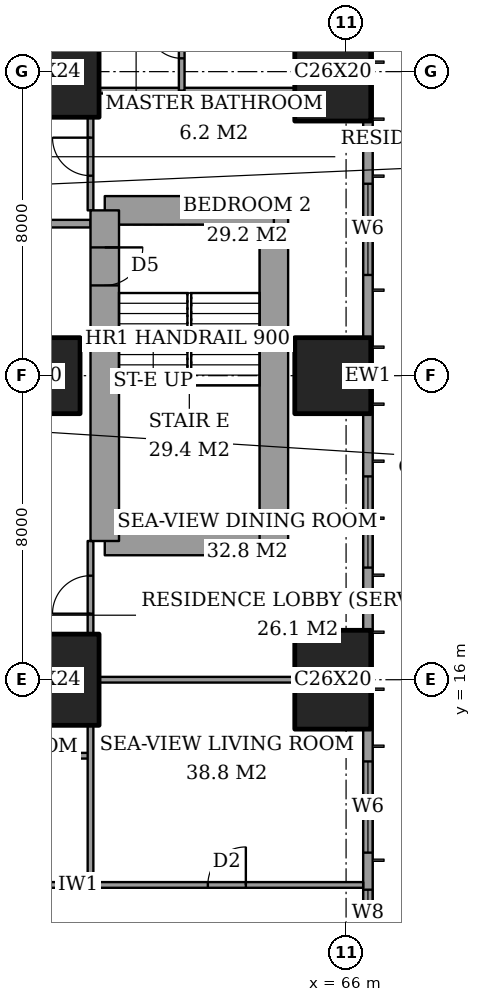
"""IFC4 building model, lengths in metres.
Left out: names, types, materials, properties, quantities, classifications, styles, units other than length and angle.
Written with IfcOpenShell. Run it as: python <this file> out.ifc"""

import sys

from ifc_helpers import new_model, si_unit, direction, frame, frame_2d, origin, origin_2d, place, context, subcontext, project, spatial, rectangle, extrude, element, fill, save


model = new_model("IFC4")
c1 = context("Model", 3, precision=1e-05, world=origin(), true_north=direction((0.0, 1.0)))
c2 = subcontext(c1, "Body", "Model", "MODEL_VIEW")
j1 = project(units=[si_unit("LENGTHUNIT", "METRE"), si_unit("PLANEANGLEUNIT", "RADIAN")], contexts=[c1])
p1 = place(None, origin())
s1 = spatial("IfcSite", under=j1, at=p1, CompositionType="ELEMENT")
p2 = place(p1, origin())
s2 = spatial("IfcBuilding", under=s1, at=p2, CompositionType="ELEMENT")
p3 = place(p2, frame((0.0, 0.0, 72.8)))
s3 = spatial("IfcBuildingStorey", under=s2, at=p3, CompositionType="ELEMENT", Elevation=72.8)
p4 = place(p3, frame((58.0, 16.0, 0.0), z_axis=(0.0, 0.0, 1.0), x_axis=(1.0, 0.0, 0.0)))
e1 = element("IfcColumn", 1, at=p4, inside=s3, PredefinedType="COLUMN", context=c2, shape_type="SweptSolid", body=[
    extrude(rectangle(XDim=3.0, YDim=2.4, at=origin_2d()), origin(), (0.0, 0.0, 1.0), 3.6),
])
p5 = place(p3, frame((58.0, 24.0, 0.0), z_axis=(0.0, 0.0, 1.0), x_axis=(1.0, 0.0, 0.0)))
e2 = element("IfcColumn", 2, at=p5, inside=s3, PredefinedType="COLUMN", context=c2, shape_type="SweptSolid", body=[
    extrude(rectangle(XDim=2.0, YDim=2.0, at=origin_2d()), origin(), (0.0, 0.0, 1.0), 3.6),
])
p6 = place(p3, frame((58.0, 32.0, 0.0), z_axis=(0.0, 0.0, 1.0), x_axis=(1.0, 0.0, 0.0)))
e3 = element("IfcColumn", 3, at=p6, inside=s3, PredefinedType="COLUMN", context=c2, shape_type="SweptSolid", body=[
    extrude(rectangle(XDim=3.0, YDim=2.4, at=origin_2d()), origin(), (0.0, 0.0, 1.0), 3.6),
])
p7 = place(p3, frame((65.65, 16.0, 0.0), z_axis=(0.0, 0.0, 1.0), x_axis=(0.0, 1.0, 0.0)))
e4 = element("IfcColumn", 4, at=p7, inside=s3, PredefinedType="COLUMN", context=c2, shape_type="SweptSolid", body=[
    extrude(rectangle(XDim=2.6, YDim=2.0, at=origin_2d()), origin(), (0.0, 0.0, 1.0), 3.6),
])
p8 = place(p3, frame((65.65, 24.0, 0.0), z_axis=(0.0, 0.0, 1.0), x_axis=(1.0, 0.0, 0.0)))
e5 = element("IfcColumn", 5, at=p8, inside=s3, PredefinedType="COLUMN", context=c2, shape_type="SweptSolid", body=[
    extrude(rectangle(XDim=2.0, YDim=2.0, at=origin_2d()), origin(), (0.0, 0.0, 1.0), 3.6),
])
p9 = place(p3, frame((65.65, 32.0, 0.0), z_axis=(0.0, 0.0, 1.0), x_axis=(0.0, 1.0, 0.0)))
e6 = element("IfcColumn", 6, at=p9, inside=s3, PredefinedType="COLUMN", context=c2, shape_type="SweptSolid", body=[
    extrude(rectangle(XDim=2.6, YDim=2.0, at=origin_2d()), origin(), (0.0, 0.0, 1.0), 3.6),
])
p10 = place(p3, frame((59.65, 19.65, 0.0), z_axis=(0.0, 0.0, 1.0), x_axis=(1.0, 0.0, 0.0)))
e7 = element("IfcWall", 7, at=p10, inside=s3, PredefinedType="SHEAR", context=c2, shape_type="SweptSolid", body=[
    extrude(rectangle(XDim=4.45, YDim=0.75, at=frame_2d((2.225, 0.0))), origin(), (0.0, 0.0, 1.0), 3.6),
])
p11 = place(p3, frame((64.1, 19.65, 0.0), z_axis=(0.0, 0.0, 1.0), x_axis=(0.0, 1.0, 0.0)))
e8 = element("IfcWall", 8, at=p11, inside=s3, PredefinedType="SHEAR", context=c2, shape_type="SweptSolid", body=[
    extrude(rectangle(XDim=8.7, YDim=0.75, at=frame_2d((4.35, 0.0))), origin(), (0.0, 0.0, 1.0), 3.6),
])
p12 = place(p3, frame((64.1, 28.35, 0.0), z_axis=(0.0, 0.0, 1.0), x_axis=(-1.0, 0.0, 0.0)))
e9 = element("IfcWall", 9, at=p12, inside=s3, PredefinedType="SHEAR", context=c2, shape_type="SweptSolid", body=[
    extrude(rectangle(XDim=4.45, YDim=0.75, at=frame_2d((2.225, 0.0))), origin(), (0.0, 0.0, 1.0), 3.6),
])
p13 = place(p3, frame((59.65, 28.35, 0.0), z_axis=(0.0, 0.0, 1.0), x_axis=(0.0, -1.0, 0.0)))
e10 = element("IfcWall", 10, at=p13, inside=s3, PredefinedType="SHEAR", context=c2, shape_type="SweptSolid", body=[
    extrude(rectangle(XDim=8.7, YDim=0.75, at=frame_2d((4.35, 0.0))), origin(), (0.0, 0.0, 1.0), 3.6),
])
p14 = place(p13, frame((0.975, 0.0, 0.0)))
e11 = element("IfcOpeningElement", 11, at=p14, cuts=e10, PredefinedType="OPENING", context=c2, shape_type="SweptSolid", body=[
    extrude(rectangle(XDim=1.0, YDim=2.1, at=frame_2d((0.5, 1.05))), frame((0.0, 0.385, 0.0), z_axis=(0.0, -1.0, 0.0), x_axis=(1.0, 0.0, 0.0)), (0.0, 0.0, 1.0), 0.77),
])
p15 = place(p3, frame((66.575, 3.175, 0.0), z_axis=(0.0, 0.0, 1.0), x_axis=(0.0, 1.0, 0.0)))
e12 = element("IfcWall", 12, at=p15, inside=s3, PredefinedType="SOLIDWALL", context=c2, shape_type="SweptSolid", body=[
    extrude(rectangle(XDim=41.65, YDim=0.25, at=frame_2d((20.825, 0.0))), origin(), (0.0, 0.0, 1.0), 3.6),
])
p16 = place(p15, frame((0.775, 0.0, 0.6)))
e13 = element("IfcOpeningElement", 13, at=p16, cuts=e12, PredefinedType="OPENING", context=c2, shape_type="SweptSolid", body=[
    extrude(rectangle(XDim=2.4, YDim=2.0, at=frame_2d((1.2, 1.0))), frame((0.0, 0.135, 0.0), z_axis=(0.0, -1.0, 0.0), x_axis=(1.0, 0.0, 0.0)), (0.0, 0.0, 1.0), 0.27),
])
p17 = place(p15, frame((6.1, 0.0, 0.6)))
e14 = element("IfcOpeningElement", 14, at=p17, cuts=e12, PredefinedType="OPENING", context=c2, shape_type="SweptSolid", body=[
    extrude(rectangle(XDim=1.2, YDim=2.0, at=frame_2d((0.6, 1.0))), frame((0.0, 0.135, 0.0), z_axis=(0.0, -1.0, 0.0), x_axis=(1.0, 0.0, 0.0)), (0.0, 0.0, 1.0), 0.27),
])
p18 = place(p15, frame((8.275, 0.0, 0.6)))
e15 = element("IfcOpeningElement", 15, at=p18, cuts=e12, PredefinedType="OPENING", context=c2, shape_type="SweptSolid", body=[
    extrude(rectangle(XDim=2.4, YDim=2.0, at=frame_2d((1.2, 1.0))), frame((0.0, 0.135, 0.0), z_axis=(0.0, -1.0, 0.0), x_axis=(1.0, 0.0, 0.0)), (0.0, 0.0, 1.0), 0.27),
])
p19 = place(p15, frame((15.775, 0.0, 0.6)))
e16 = element("IfcOpeningElement", 16, at=p19, cuts=e12, PredefinedType="OPENING", context=c2, shape_type="SweptSolid", body=[
    extrude(rectangle(XDim=2.4, YDim=2.0, at=frame_2d((1.2, 1.0))), frame((0.0, 0.135, 0.0), z_axis=(0.0, -1.0, 0.0), x_axis=(1.0, 0.0, 0.0)), (0.0, 0.0, 1.0), 0.27),
])
p20 = place(p15, frame((23.475, 0.0, 0.6)))
e17 = element("IfcOpeningElement", 17, at=p20, cuts=e12, PredefinedType="OPENING", context=c2, shape_type="SweptSolid", body=[
    extrude(rectangle(XDim=2.4, YDim=2.0, at=frame_2d((1.2, 1.0))), frame((0.0, 0.135, 0.0), z_axis=(0.0, -1.0, 0.0), x_axis=(1.0, 0.0, 0.0)), (0.0, 0.0, 1.0), 0.27),
])
p21 = place(p15, frame((30.975, 0.0, 0.6)))
e18 = element("IfcOpeningElement", 18, at=p21, cuts=e12, PredefinedType="OPENING", context=c2, shape_type="SweptSolid", body=[
    extrude(rectangle(XDim=2.4, YDim=2.0, at=frame_2d((1.2, 1.0))), frame((0.0, 0.135, 0.0), z_axis=(0.0, -1.0, 0.0), x_axis=(1.0, 0.0, 0.0)), (0.0, 0.0, 1.0), 0.27),
])
p22 = place(p15, frame((34.5, 0.0, 0.6)))
e19 = element("IfcOpeningElement", 19, at=p22, cuts=e12, PredefinedType="OPENING", context=c2, shape_type="SweptSolid", body=[
    extrude(rectangle(XDim=1.2, YDim=2.0, at=frame_2d((0.6, 1.0))), frame((0.0, 0.135, 0.0), z_axis=(0.0, -1.0, 0.0), x_axis=(1.0, 0.0, 0.0)), (0.0, 0.0, 1.0), 0.27),
])
p23 = place(p15, frame((38.475, 0.0, 0.6)))
e20 = element("IfcOpeningElement", 20, at=p23, cuts=e12, PredefinedType="OPENING", context=c2, shape_type="SweptSolid", body=[
    extrude(rectangle(XDim=2.4, YDim=2.0, at=frame_2d((1.2, 1.0))), frame((0.0, 0.135, 0.0), z_axis=(0.0, -1.0, 0.0), x_axis=(1.0, 0.0, 0.0)), (0.0, 0.0, 1.0), 0.27),
])
p24 = place(p3, frame((41.439, 10.6, 0.0), z_axis=(0.0, 0.0, 1.0), x_axis=(1.0, 0.0, 0.0)))
e21 = element("IfcWall", 21, at=p24, inside=s3, PredefinedType="PARTITIONING", context=c2, shape_type="SweptSolid", body=[
    extrude(rectangle(XDim=25.011, YDim=0.15, at=frame_2d((12.505, 0.0))), origin(), (0.0, 0.0, 1.0), 3.35),
])
p25 = place(p24, frame((10.761, 0.0, 0.0)))
e22 = element("IfcOpeningElement", 22, at=p25, cuts=e21, PredefinedType="OPENING", context=c2, shape_type="SweptSolid", body=[
    extrude(rectangle(XDim=1.0, YDim=2.1, at=frame_2d((0.5, 1.05))), frame((0.0, 0.085, 0.0), z_axis=(0.0, -1.0, 0.0), x_axis=(1.0, 0.0, 0.0)), (0.0, 0.0, 1.0), 0.17),
])
p26 = place(p24, frame((20.924, 0.0, 0.0)))
e23 = element("IfcOpeningElement", 23, at=p26, cuts=e21, PredefinedType="OPENING", context=c2, shape_type="SweptSolid", body=[
    extrude(rectangle(XDim=1.0, YDim=2.1, at=frame_2d((0.5, 1.05))), frame((0.0, 0.085, 0.0), z_axis=(0.0, -1.0, 0.0), x_axis=(1.0, 0.0, 0.0)), (0.0, 0.0, 1.0), 0.17),
])
p27 = place(p24, frame((15.749, 0.0, 0.0)))
e24 = element("IfcOpeningElement", 24, at=p27, cuts=e21, PredefinedType="OPENING", context=c2, shape_type="SweptSolid", body=[
    extrude(rectangle(XDim=0.9, YDim=2.1, at=frame_2d((0.45, 1.05))), frame((0.0, 0.085, 0.0), z_axis=(0.0, -1.0, 0.0), x_axis=(1.0, 0.0, 0.0)), (0.0, 0.0, 1.0), 0.17),
])
p28 = place(p24, frame((12.961, 0.0, 0.0)))
e25 = element("IfcOpeningElement", 25, at=p28, cuts=e21, PredefinedType="OPENING", context=c2, shape_type="SweptSolid", body=[
    extrude(rectangle(XDim=1.0, YDim=2.1, at=frame_2d((0.5, 1.05))), frame((0.0, 0.085, 0.0), z_axis=(0.0, -1.0, 0.0), x_axis=(1.0, 0.0, 0.0)), (0.0, 0.0, 1.0), 0.17),
])
p29 = place(p24, frame((7.861, 0.0, 0.0)))
e26 = element("IfcOpeningElement", 26, at=p29, cuts=e21, PredefinedType="OPENING", context=c2, shape_type="SweptSolid", body=[
    extrude(rectangle(XDim=1.0, YDim=2.1, at=frame_2d((0.5, 1.05))), frame((0.0, 0.085, 0.0), z_axis=(0.0, -1.0, 0.0), x_axis=(1.0, 0.0, 0.0)), (0.0, 0.0, 1.0), 0.17),
])
p30 = place(p24, frame((2.836, 0.0, 0.0)))
e27 = element("IfcOpeningElement", 27, at=p30, cuts=e21, PredefinedType="OPENING", context=c2, shape_type="SweptSolid", body=[
    extrude(rectangle(XDim=1.0, YDim=2.1, at=frame_2d((0.5, 1.05))), frame((0.0, 0.085, 0.0), z_axis=(0.0, -1.0, 0.0), x_axis=(1.0, 0.0, 0.0)), (0.0, 0.0, 1.0), 0.17),
])
p31 = place(p3, frame((56.0, 14.0, 0.0), z_axis=(0.0, 0.0, 1.0), x_axis=(1.0, 0.0, 0.0)))
e28 = element("IfcWall", 28, at=p31, inside=s3, PredefinedType="PARTITIONING", context=c2, shape_type="SweptSolid", body=[
    extrude(rectangle(XDim=3.275, YDim=0.15, at=frame_2d((1.637, 0.0))), origin(), (0.0, 0.0, 1.0), 3.35),
])
p32 = place(p3, frame((59.5, 16.0, 0.0), z_axis=(0.0, 0.0, 1.0), x_axis=(1.0, 0.0, 0.0)))
e29 = element("IfcWall", 29, at=p32, inside=s3, PredefinedType="PARTITIONING", context=c2, shape_type="SweptSolid", body=[
    extrude(rectangle(XDim=5.15, YDim=0.15, at=frame_2d((2.575, 0.0))), origin(), (0.0, 0.0, 1.0), 2.634),
])
p33 = place(p3, frame((42.0, 28.0, 0.0), z_axis=(0.0, 0.0, 1.0), x_axis=(1.0, 0.0, 0.0)))
e30 = element("IfcWall", 30, at=p33, inside=s3, PredefinedType="PARTITIONING", context=c2, shape_type="SweptSolid", body=[
    extrude(rectangle(XDim=17.275, YDim=0.2, at=frame_2d((8.637, 0.0))), origin(), (0.0, 0.0, 1.0), 3.35),
])
p34 = place(p33, frame((9.5, 0.0, 0.0)))
e31 = element("IfcOpeningElement", 31, at=p34, cuts=e30, PredefinedType="OPENING", context=c2, shape_type="SweptSolid", body=[
    extrude(rectangle(XDim=1.2, YDim=2.4, at=frame_2d((0.6, 1.2))), frame((0.0, 0.11, 0.0), z_axis=(0.0, -1.0, 0.0), x_axis=(1.0, 0.0, 0.0)), (0.0, 0.0, 1.0), 0.22),
])
p35 = place(p3, frame((59.5, 31.5, 0.0), z_axis=(0.0, 0.0, 1.0), x_axis=(1.0, 0.0, 0.0)))
e32 = element("IfcWall", 32, at=p35, inside=s3, PredefinedType="PARTITIONING", context=c2, shape_type="SweptSolid", body=[
    extrude(rectangle(XDim=5.15, YDim=0.15, at=frame_2d((2.575, 0.0))), origin(), (0.0, 0.0, 1.0), 3.35),
])
p36 = place(p3, frame((59.275, 10.6, 0.0), z_axis=(0.0, 0.0, 1.0), x_axis=(0.0, 1.0, 0.0)))
e33 = element("IfcWall", 33, at=p36, inside=s3, PredefinedType="PARTITIONING", context=c2, shape_type="SweptSolid", body=[
    extrude(rectangle(XDim=4.2, YDim=0.15, at=frame_2d((2.1, 0.0))), origin(), (0.0, 0.0, 1.0), 3.35),
])
p37 = place(p3, frame((59.275, 17.2, 0.0), z_axis=(0.0, 0.0, 1.0), x_axis=(0.0, 1.0, 0.0)))
e34 = element("IfcWall", 34, at=p37, inside=s3, PredefinedType="PARTITIONING", context=c2, shape_type="SweptSolid", body=[
    extrude(rectangle(XDim=2.45, YDim=0.15, at=frame_2d((1.225, 0.0))), origin(), (0.0, 0.0, 1.0), 3.35),
])
p38 = place(p37, frame((0.538, 0.0, 0.0)))
e35 = element("IfcOpeningElement", 35, at=p38, cuts=e34, PredefinedType="OPENING", context=c2, shape_type="SweptSolid", body=[
    extrude(rectangle(XDim=1.0, YDim=2.1, at=frame_2d((0.5, 1.05))), frame((0.0, 0.085, 0.0), z_axis=(0.0, -1.0, 0.0), x_axis=(1.0, 0.0, 0.0)), (0.0, 0.0, 1.0), 0.17),
])
p39 = place(p3, frame((59.275, 28.35, 0.0), z_axis=(0.0, 0.0, 1.0), x_axis=(0.0, 1.0, 0.0)))
e36 = element("IfcWall", 36, at=p39, inside=s3, PredefinedType="PARTITIONING", context=c2, shape_type="SweptSolid", body=[
    extrude(rectangle(XDim=2.45, YDim=0.15, at=frame_2d((1.225, 0.0))), origin(), (0.0, 0.0, 1.0), 3.35),
])
p40 = place(p39, frame((0.913, 0.0, 0.0)))
e37 = element("IfcOpeningElement", 37, at=p40, cuts=e36, PredefinedType="OPENING", context=c2, shape_type="SweptSolid", body=[
    extrude(rectangle(XDim=1.0, YDim=2.1, at=frame_2d((0.5, 1.05))), frame((0.0, 0.085, 0.0), z_axis=(0.0, -1.0, 0.0), x_axis=(1.0, 0.0, 0.0)), (0.0, 0.0, 1.0), 0.17),
])
p41 = place(p3, frame((61.675, 31.5, 0.0), z_axis=(0.0, 0.0, 1.0), x_axis=(0.0, 1.0, 0.0)))
e38 = element("IfcWall", 38, at=p41, inside=s3, PredefinedType="PARTITIONING", context=c2, shape_type="SweptSolid", body=[
    extrude(rectangle(XDim=2.6, YDim=0.15, at=frame_2d((1.3, 0.0))), origin(), (0.0, 0.0, 1.0), 3.35),
])
p42 = place(p41, frame((0.85, 0.0, 0.0)))
e39 = element("IfcOpeningElement", 39, at=p42, cuts=e38, PredefinedType="OPENING", context=c2, shape_type="SweptSolid", body=[
    extrude(rectangle(XDim=0.9, YDim=2.1, at=frame_2d((0.45, 1.05))), frame((0.0, 0.085, 0.0), z_axis=(0.0, -1.0, 0.0), x_axis=(1.0, 0.0, 0.0)), (0.0, 0.0, 1.0), 0.17),
])
p43 = place(p17, origin())
e40 = element("IfcWindow", 40, at=p43, inside=s3, PartitioningType="SINGLE_PANEL", PredefinedType="WINDOW", context=c2, shape_type="SweptSolid", body=[
    extrude(rectangle(XDim=1.2, YDim=2.0, at=frame_2d((0.6, 1.0))), frame((0.0, 0.03, 0.0), z_axis=(0.0, -1.0, 0.0), x_axis=(1.0, 0.0, 0.0)), (0.0, 0.0, 1.0), 0.06),
])
fill(e14, e40)
p44 = place(p18, origin())
e41 = element("IfcWindow", 41, at=p44, inside=s3, PartitioningType="SINGLE_PANEL", PredefinedType="WINDOW", context=c2, shape_type="SweptSolid", body=[
    extrude(rectangle(XDim=2.4, YDim=2.0, at=frame_2d((1.2, 1.0))), frame((0.0, 0.03, 0.0), z_axis=(0.0, -1.0, 0.0), x_axis=(1.0, 0.0, 0.0)), (0.0, 0.0, 1.0), 0.06),
])
fill(e15, e41)
p45 = place(p19, origin())
e42 = element("IfcWindow", 42, at=p45, inside=s3, PartitioningType="SINGLE_PANEL", PredefinedType="WINDOW", context=c2, shape_type="SweptSolid", body=[
    extrude(rectangle(XDim=2.4, YDim=2.0, at=frame_2d((1.2, 1.0))), frame((0.0, 0.03, 0.0), z_axis=(0.0, -1.0, 0.0), x_axis=(1.0, 0.0, 0.0)), (0.0, 0.0, 1.0), 0.06),
])
fill(e16, e42)
p46 = place(p20, origin())
e43 = element("IfcWindow", 43, at=p46, inside=s3, PartitioningType="SINGLE_PANEL", PredefinedType="WINDOW", context=c2, shape_type="SweptSolid", body=[
    extrude(rectangle(XDim=2.4, YDim=2.0, at=frame_2d((1.2, 1.0))), frame((0.0, 0.03, 0.0), z_axis=(0.0, -1.0, 0.0), x_axis=(1.0, 0.0, 0.0)), (0.0, 0.0, 1.0), 0.06),
])
fill(e17, e43)
p47 = place(p26, origin())
e44 = element("IfcDoor", 44, at=p47, inside=s3, OperationType="SINGLE_SWING_LEFT", PredefinedType="DOOR", context=c2, shape_type="SweptSolid", body=[
    extrude(rectangle(XDim=1.0, YDim=2.1, at=frame_2d((0.5, 1.05))), frame((0.0, 0.025, 0.0), z_axis=(0.0, -1.0, 0.0), x_axis=(1.0, 0.0, 0.0)), (0.0, 0.0, 1.0), 0.05),
])
fill(e23, e44)
p48 = place(p38, origin())
e45 = element("IfcDoor", 45, at=p48, inside=s3, OperationType="SINGLE_SWING_RIGHT", PredefinedType="DOOR", context=c2, shape_type="SweptSolid", body=[
    extrude(rectangle(XDim=1.0, YDim=2.1, at=frame_2d((0.5, 1.05))), frame((0.0, 0.025, 0.0), z_axis=(0.0, -1.0, 0.0), x_axis=(1.0, 0.0, 0.0)), (0.0, 0.0, 1.0), 0.05),
])
fill(e35, e45)
p49 = place(p42, origin())
e46 = element("IfcDoor", 46, at=p49, inside=s3, OperationType="SINGLE_SWING_LEFT", PredefinedType="DOOR", context=c2, shape_type="SweptSolid", body=[
    extrude(rectangle(XDim=0.9, YDim=2.1, at=frame_2d((0.45, 1.05))), frame((0.0, 0.025, 0.0), z_axis=(0.0, -1.0, 0.0), x_axis=(1.0, 0.0, 0.0)), (0.0, 0.0, 1.0), 0.05),
])
fill(e39, e46)
p50 = place(p40, origin())
e47 = element("IfcDoor", 47, at=p50, inside=s3, OperationType="SINGLE_SWING_LEFT", PredefinedType="DOOR", context=c2, shape_type="SweptSolid", body=[
    extrude(rectangle(XDim=1.0, YDim=2.1, at=frame_2d((0.5, 1.05))), frame((0.0, 0.025, 0.0), z_axis=(0.0, -1.0, 0.0), x_axis=(1.0, 0.0, 0.0)), (0.0, 0.0, 1.0), 0.05),
])
fill(e37, e47)
p51 = place(p14, origin())
e48 = element("IfcDoor", 48, at=p51, inside=s3, OperationType="SINGLE_SWING_RIGHT", PredefinedType="DOOR", context=c2, shape_type="SweptSolid", body=[
    extrude(rectangle(XDim=1.0, YDim=2.1, at=frame_2d((0.5, 1.05))), frame((0.0, 0.025, 0.0), z_axis=(0.0, -1.0, 0.0), x_axis=(1.0, 0.0, 0.0)), (0.0, 0.0, 1.0), 0.05),
])
fill(e11, e48)
save(model, sys.argv[1])
